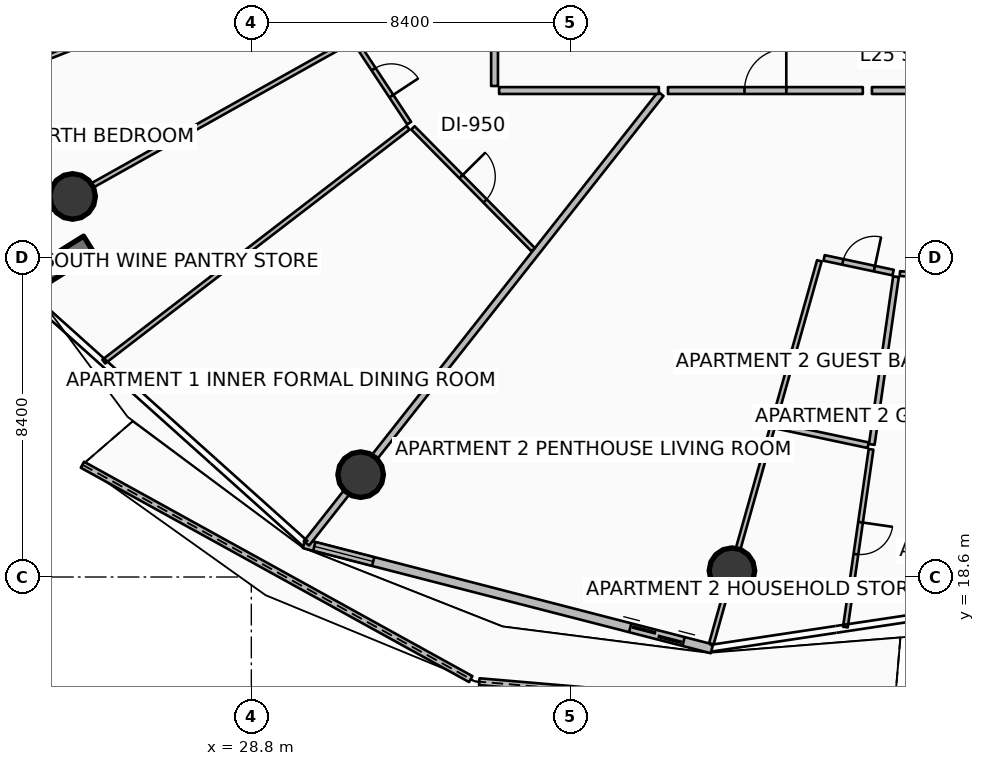
"""IFC4 building model, lengths in metres.
Left out: names, types, materials, properties, quantities, classifications, styles, units other than length and angle.
Written with IfcOpenShell. Run it as: python <this file> out.ifc"""

import sys

from ifc_helpers import new_model, si_unit, direction, frame, frame_2d, origin, origin_2d, place, context, subcontext, project, spatial, polyline, rectangle, circle, outline, extrude, element, fill, save


model = new_model("IFC4")
c1 = context("Model", 3, precision=1e-05, world=origin(), true_north=direction((0.0, 1.0)))
c2 = subcontext(c1, "Body", "Model", "MODEL_VIEW")
j1 = project(units=[si_unit("LENGTHUNIT", "METRE"), si_unit("PLANEANGLEUNIT", "RADIAN")], contexts=[c1])
p1 = place(None, origin())
s1 = spatial("IfcSite", under=j1, at=p1, CompositionType="ELEMENT")
p2 = place(p1, origin())
s2 = spatial("IfcBuilding", under=s1, at=p2, CompositionType="ELEMENT")
p3 = place(p2, frame((0.0, 0.0, 101.4)))
s3 = spatial("IfcBuildingStorey", under=s2, at=p3, CompositionType="ELEMENT", Elevation=101.4)
p4 = place(p3, frame((24.531, 27.335, 0.0), z_axis=(0.0, 0.0, 1.0), x_axis=(-0.848053161125, -0.529911158502, 0.0)))
e1 = element("IfcWall", 1, at=p4, inside=s3, PredefinedType="SOLIDWALL", context=c2, shape_type="SweptSolid", body=[
    extrude(rectangle(XDim=3.5, YDim=0.55, at=frame_2d((1.75, 0.0))), origin(), (0.0, 0.0, 1.0), 3.75),
])
for number, where, z_axis, x_axis in (
    (2, (24.097, 28.614, 0.0), (0.0, 0.0, 1.0), (1.0, 0.0, 0.0)),
    (3, (31.677, 21.294, 0.0), (0.0, 0.0, 1.0), (1.0, 0.0, 0.0)),
    (4, (41.447, 18.766, 0.0), (0.0, 0.0, 1.0), (1.0, 0.0, 0.0)),
):
    element("IfcColumn", number, at=place(p3, frame(where, z_axis=z_axis, x_axis=x_axis)), inside=s3, PredefinedType="COLUMN", context=c2, shape_type="SweptSolid", body=[
        extrude(circle(Radius=0.6, at=origin_2d()), origin(), (0.0, 0.0, 1.0), 3.5),
    ])
p5 = place(p3, frame((24.356, 21.555, 0.0), z_axis=(0.0, 0.0, 1.0), x_axis=(0.875456537623, -0.483296855704, 0.0)))
e5 = element("IfcWall", 5, at=p5, inside=s3, PredefinedType="PARAPET", context=c2, shape_type="SweptSolid", body=[
    extrude(outline(polyline([(0.0, 0.0), (11.672, 0.0), (11.672, 1.148), (5.836, 1.127), (0.0, 1.224), (0.0, 0.0)])), frame((0.0, 0.09, 0.0), z_axis=(0.0, -1.0, 0.0), x_axis=(1.0, 0.0, 0.0)), (0.0, 0.0, 1.0), 0.18),
])
p6 = place(p3, frame((34.799, 15.846, 0.0), z_axis=(0.0, 0.0, 1.0), x_axis=(0.996375069037, -0.08506892383, 0.0)))
e6 = element("IfcWall", 6, at=p6, inside=s3, PredefinedType="PARAPET", context=c2, shape_type="SweptSolid", body=[
    extrude(outline(polyline([(0.0, 0.0), (10.943, 0.0), (10.943, 1.483), (5.471, 1.284), (0.0, 1.148), (0.0, 0.0)])), frame((0.0, 0.09, 0.0), z_axis=(0.0, -1.0, 0.0), x_axis=(1.0, 0.0, 0.0)), (0.0, 0.0, 1.0), 0.18),
])
p7 = place(p3, frame((30.186, 19.477, 0.0), z_axis=(0.0, 0.0, 1.0), x_axis=(0.968356180858, -0.249572248045, 0.0)))
e7 = element("IfcWall", 7, at=p7, inside=s3, PredefinedType="SOLIDWALL", context=c2, shape_type="SweptSolid", body=[
    extrude(rectangle(XDim=11.084, YDim=0.24, at=frame_2d((5.542, 0.0))), origin(), (0.0, 0.0, 1.0), 2.45),
])
p8 = place(p7, frame((8.865, 0.0, 0.0)))
e8 = element("IfcOpeningElement", 8, at=p8, cuts=e7, PredefinedType="OPENING", context=c2, shape_type="SweptSolid", body=[
    extrude(rectangle(XDim=1.45, YDim=2.15, at=frame_2d((0.725, 1.075))), frame((0.0, 0.13, 0.0), z_axis=(0.0, -1.0, 0.0), x_axis=(1.0, 0.0, 0.0)), (0.0, 0.0, 1.0), 0.26),
])
p9 = place(p7, frame((0.28, 0.0, 0.65)))
e9 = element("IfcOpeningElement", 9, at=p9, cuts=e7, PredefinedType="OPENING", context=c2, shape_type="SweptSolid", body=[
    extrude(rectangle(XDim=1.6, YDim=1.5, at=frame_2d((0.8, 0.75))), frame((0.0, 0.13, 0.0), z_axis=(0.0, -1.0, 0.0), x_axis=(1.0, 0.0, 0.0)), (0.0, 0.0, 1.0), 0.26),
])
p10 = place(p3, frame((39.575, 31.314, 0.0), z_axis=(0.0, 0.0, 1.0), x_axis=(-0.619083417853, -0.785325233098, 0.0)))
e10 = element("IfcWall", 10, at=p10, inside=s3, PredefinedType="PARTITIONING", context=c2, shape_type="SweptSolid", body=[
    extrude(rectangle(XDim=15.063, YDim=0.18, at=frame_2d((7.532, 0.0))), origin(), (0.0, 0.0, 1.0), 2.94),
])
p11 = place(p3, frame((30.326, 35.002, 0.0), z_axis=(0.0, 0.0, 1.0), x_axis=(-0.929777602375, -0.368121732748, 0.0)))
e11 = element("IfcWall", 11, at=p11, inside=s3, PredefinedType="PARTITIONING", context=c2, shape_type="SweptSolid", body=[
    extrude(rectangle(XDim=9.961, YDim=0.125, at=frame_2d((4.98, 0.0))), origin(), (0.0, 0.0, 1.0), 2.94),
])
p12 = place(p3, frame((35.2, 34.712, 0.0), z_axis=(0.0, 0.0, 1.0), x_axis=(0.0, -1.0, 0.0)))
e12 = element("IfcWall", 12, at=p12, inside=s3, PredefinedType="PARTITIONING", context=c2, shape_type="SweptSolid", body=[
    extrude(rectangle(XDim=3.192, YDim=0.18, at=frame_2d((1.596, 0.0))), origin(), (0.0, 0.0, 1.0), 2.94),
])
p13 = place(p3, frame((35.32, 31.4, 0.0), z_axis=(0.0, 0.0, 1.0), x_axis=(1.0, 0.0, 0.0)))
e13 = element("IfcWall", 13, at=p13, inside=s3, PredefinedType="PARTITIONING", context=c2, shape_type="SweptSolid", body=[
    extrude(rectangle(XDim=4.204, YDim=0.18, at=frame_2d((2.102, 0.0))), origin(), (0.0, 0.0, 1.0), 2.94),
])
p14 = place(p3, frame((31.406, 32.707, 0.0), z_axis=(0.0, 0.0, 1.0), x_axis=(-0.872500841978, -0.488612608052, 0.0)))
e14 = element("IfcWall", 14, at=p14, inside=s3, PredefinedType="PARTITIONING", context=c2, shape_type="SweptSolid", body=[
    extrude(rectangle(XDim=10.46, YDim=0.125, at=frame_2d((5.23, 0.0))), origin(), (0.0, 0.0, 1.0), 2.94),
])
p15 = place(p3, frame((32.925, 30.42, 0.0), z_axis=(0.0, 0.0, 1.0), x_axis=(-0.793033627653, -0.609177860244, 0.0)))
e15 = element("IfcWall", 15, at=p15, inside=s3, PredefinedType="PARTITIONING", context=c2, shape_type="SweptSolid", body=[
    extrude(rectangle(XDim=10.099, YDim=0.125, at=frame_2d((5.049, 0.0))), origin(), (0.0, 0.0, 1.0), 2.94),
])
p16 = place(p3, frame((31.548, 32.672, 0.0), z_axis=(0.0, 0.0, 1.0), x_axis=(0.550387635728, -0.834909246827, 0.0)))
e16 = element("IfcWall", 16, at=p16, inside=s3, PredefinedType="PARTITIONING", context=c2, shape_type="SweptSolid", body=[
    extrude(rectangle(XDim=2.552, YDim=0.125, at=frame_2d((1.276, 0.0))), origin(), (0.0, 0.0, 1.0), 2.94),
])
p17 = place(p16, frame((0.851, 0.0, 0.0)))
e17 = element("IfcOpeningElement", 17, at=p17, cuts=e16, PredefinedType="OPENING", context=c2, shape_type="SweptSolid", body=[
    extrude(rectangle(XDim=0.85, YDim=2.06, at=frame_2d((0.425, 1.03))), frame((0.0, 0.073, 0.0), z_axis=(0.0, -1.0, 0.0), x_axis=(1.0, 0.0, 0.0)), (0.0, 0.0, 1.0), 0.145),
])
p18 = place(p3, frame((33.053, 30.418, 0.0), z_axis=(0.0, 0.0, 1.0), x_axis=(0.702647387595, -0.711538227157, 0.0)))
e18 = element("IfcWall", 18, at=p18, inside=s3, PredefinedType="PARTITIONING", context=c2, shape_type="SweptSolid", body=[
    extrude(rectangle(XDim=4.503, YDim=0.125, at=frame_2d((2.252, 0.0))), origin(), (0.0, 0.0, 1.0), 2.94),
])
p19 = place(p18, frame((1.802, 0.0, 0.0)))
e19 = element("IfcOpeningElement", 19, at=p19, cuts=e18, PredefinedType="OPENING", context=c2, shape_type="SweptSolid", body=[
    extrude(rectangle(XDim=0.9, YDim=2.08, at=frame_2d((0.45, 1.04))), frame((0.0, 0.073, 0.0), z_axis=(0.0, -1.0, 0.0), x_axis=(1.0, 0.0, 0.0)), (0.0, 0.0, 1.0), 0.145),
])
p20 = place(p3, frame((39.764, 31.4, 0.0), z_axis=(0.0, 0.0, 1.0), x_axis=(1.0, 0.0, 0.0)))
e20 = element("IfcWall", 20, at=p20, inside=s3, PredefinedType="PARTITIONING", context=c2, shape_type="SweptSolid", body=[
    extrude(rectangle(XDim=5.127, YDim=0.18, at=frame_2d((2.563, 0.0))), origin(), (0.0, 0.0, 1.0), 2.94),
])
p21 = place(p20, frame((2.013, 0.0, 0.0)))
e21 = element("IfcOpeningElement", 21, at=p21, cuts=e20, PredefinedType="OPENING", context=c2, shape_type="SweptSolid", body=[
    extrude(rectangle(XDim=1.1, YDim=2.1, at=frame_2d((0.55, 1.05))), frame((0.0, 0.1, 0.0), z_axis=(0.0, -1.0, 0.0), x_axis=(1.0, 0.0, 0.0)), (0.0, 0.0, 1.0), 0.2),
])
p22 = place(p3, frame((45.131, 31.4, 0.0), z_axis=(0.0, 0.0, 1.0), x_axis=(1.0, 0.0, 0.0)))
e22 = element("IfcWall", 22, at=p22, inside=s3, PredefinedType="PARTITIONING", context=c2, shape_type="SweptSolid", body=[
    extrude(rectangle(XDim=4.004, YDim=0.18, at=frame_2d((2.002, 0.0))), origin(), (0.0, 0.0, 1.0), 2.94),
])
p23 = place(p3, frame((43.747, 26.92, 0.0), z_axis=(0.0, 0.0, 1.0), x_axis=(-0.271445765154, -0.962453737371, 0.0)))
e23 = element("IfcWall", 23, at=p23, inside=s3, PredefinedType="PARTITIONING", context=c2, shape_type="SweptSolid", body=[
    extrude(rectangle(XDim=10.47, YDim=0.125, at=frame_2d((5.235, 0.0))), origin(), (0.0, 0.0, 1.0), 2.94),
])
p24 = place(p3, frame((43.872, 26.996, 0.0), z_axis=(0.0, 0.0, 1.0), x_axis=(0.978233316216, -0.207508021641, 0.0)))
e24 = element("IfcWall", 24, at=p24, inside=s3, PredefinedType="PARTITIONING", context=c2, shape_type="SweptSolid", body=[
    extrude(rectangle(XDim=1.857, YDim=0.15, at=frame_2d((0.928, 0.0))), origin(), (0.0, 0.0, 1.0), 2.94),
])
p25 = place(p24, frame((0.503, 0.0, 0.0)))
e25 = element("IfcOpeningElement", 25, at=p25, cuts=e24, PredefinedType="OPENING", context=c2, shape_type="SweptSolid", body=[
    extrude(rectangle(XDim=0.85, YDim=2.06, at=frame_2d((0.425, 1.03))), frame((0.0, 0.085, 0.0), z_axis=(0.0, -1.0, 0.0), x_axis=(1.0, 0.0, 0.0)), (0.0, 0.0, 1.0), 0.17),
])
p26 = place(p3, frame((42.626, 22.578, 0.0), z_axis=(0.0, 0.0, 1.0), x_axis=(0.978227408947, -0.207535867706, 0.0)))
e26 = element("IfcWall", 26, at=p26, inside=s3, PredefinedType="PARTITIONING", context=c2, shape_type="SweptSolid", body=[
    extrude(rectangle(XDim=2.46, YDim=0.15, at=frame_2d((1.23, 0.0))), origin(), (0.0, 0.0, 1.0), 2.94),
])
p27 = place(p3, frame((45.763, 26.502, 0.0), z_axis=(0.0, 0.0, 1.0), x_axis=(-0.142823722461, -0.989748141853, 0.0)))
e27 = element("IfcWall", 27, at=p27, inside=s3, PredefinedType="PARTITIONING", context=c2, shape_type="SweptSolid", body=[
    extrude(rectangle(XDim=4.46, YDim=0.15, at=frame_2d((2.23, 0.0))), origin(), (0.0, 0.0, 1.0), 2.94),
])
p28 = place(p3, frame((45.108, 21.96, 0.0), z_axis=(0.0, 0.0, 1.0), x_axis=(-0.142860663544, -0.989742810437, 0.0)))
e28 = element("IfcWall", 28, at=p28, inside=s3, PredefinedType="PARTITIONING", context=c2, shape_type="SweptSolid", body=[
    extrude(rectangle(XDim=4.725, YDim=0.125, at=frame_2d((2.363, 0.0))), origin(), (0.0, 0.0, 1.0), 2.94),
])
p29 = place(p28, frame((1.938, 0.0, 0.0)))
e29 = element("IfcOpeningElement", 29, at=p29, cuts=e28, PredefinedType="OPENING", context=c2, shape_type="SweptSolid", body=[
    extrude(rectangle(XDim=0.85, YDim=2.06, at=frame_2d((0.425, 1.03))), frame((0.0, 0.073, 0.0), z_axis=(0.0, -1.0, 0.0), x_axis=(1.0, 0.0, 0.0)), (0.0, 0.0, 1.0), 0.145),
])
p30 = place(p3, frame((45.866, 26.585, 0.0), z_axis=(0.0, 0.0, 1.0), x_axis=(0.996949395434, -0.078050643458, 0.0)))
e30 = element("IfcWall", 30, at=p30, inside=s3, PredefinedType="PARTITIONING", context=c2, shape_type="SweptSolid", body=[
    extrude(rectangle(XDim=1.861, YDim=0.125, at=frame_2d((0.931, 0.0))), origin(), (0.0, 0.0, 1.0), 2.94),
])
p31 = place(p30, frame((0.506, 0.0, 0.0)))
e31 = element("IfcOpeningElement", 31, at=p31, cuts=e30, PredefinedType="OPENING", context=c2, shape_type="SweptSolid", body=[
    extrude(rectangle(XDim=0.85, YDim=2.06, at=frame_2d((0.425, 1.03))), frame((0.0, 0.073, 0.0), z_axis=(0.0, -1.0, 0.0), x_axis=(1.0, 0.0, 0.0)), (0.0, 0.0, 1.0), 0.145),
])
p32 = place(p8, origin())
e32 = element("IfcDoor", 32, at=p32, inside=s3, OperationType="DOUBLE_DOOR_SLIDING", PredefinedType="DOOR", context=c2, shape_type="SweptSolid", body=[
    extrude(rectangle(XDim=1.45, YDim=2.15, at=frame_2d((0.725, 1.075))), frame((0.0, 0.025, 0.0), z_axis=(0.0, -1.0, 0.0), x_axis=(1.0, 0.0, 0.0)), (0.0, 0.0, 1.0), 0.05),
])
fill(e8, e32)
p33 = place(p9, origin())
e33 = element("IfcWindow", 33, at=p33, inside=s3, PartitioningType="SINGLE_PANEL", PredefinedType="WINDOW", context=c2, shape_type="SweptSolid", body=[
    extrude(rectangle(XDim=1.6, YDim=1.5, at=frame_2d((0.8, 0.75))), frame((0.0, 0.03, 0.0), z_axis=(0.0, -1.0, 0.0), x_axis=(1.0, 0.0, 0.0)), (0.0, 0.0, 1.0), 0.06),
])
fill(e9, e33)
p34 = place(p17, origin())
e34 = element("IfcDoor", 34, at=p34, inside=s3, OperationType="SINGLE_SWING_RIGHT", PredefinedType="DOOR", context=c2, shape_type="SweptSolid", body=[
    extrude(rectangle(XDim=0.85, YDim=2.06, at=frame_2d((0.425, 1.03))), frame((0.0, 0.025, 0.0), z_axis=(0.0, -1.0, 0.0), x_axis=(1.0, 0.0, 0.0)), (0.0, 0.0, 1.0), 0.05),
])
fill(e17, e34)
p35 = place(p19, origin())
e35 = element("IfcDoor", 35, at=p35, inside=s3, OperationType="SINGLE_SWING_LEFT", PredefinedType="DOOR", context=c2, shape_type="SweptSolid", body=[
    extrude(rectangle(XDim=0.9, YDim=2.08, at=frame_2d((0.45, 1.04))), frame((0.0, 0.025, 0.0), z_axis=(0.0, -1.0, 0.0), x_axis=(1.0, 0.0, 0.0)), (0.0, 0.0, 1.0), 0.05),
])
fill(e19, e35)
p36 = place(p21, origin())
e36 = element("IfcDoor", 36, at=p36, inside=s3, OperationType="SINGLE_SWING_RIGHT", PredefinedType="DOOR", context=c2, shape_type="SweptSolid", body=[
    extrude(rectangle(XDim=1.1, YDim=2.1, at=frame_2d((0.55, 1.05))), frame((0.0, 0.025, 0.0), z_axis=(0.0, -1.0, 0.0), x_axis=(1.0, 0.0, 0.0)), (0.0, 0.0, 1.0), 0.05),
])
fill(e21, e36)
p37 = place(p25, origin())
e37 = element("IfcDoor", 37, at=p37, inside=s3, OperationType="SINGLE_SWING_RIGHT", PredefinedType="DOOR", context=c2, shape_type="SweptSolid", body=[
    extrude(rectangle(XDim=0.85, YDim=2.06, at=frame_2d((0.425, 1.03))), frame((0.0, 0.025, 0.0), z_axis=(0.0, -1.0, 0.0), x_axis=(1.0, 0.0, 0.0)), (0.0, 0.0, 1.0), 0.05),
])
fill(e25, e37)
p38 = place(p29, origin())
e38 = element("IfcDoor", 38, at=p38, inside=s3, OperationType="SINGLE_SWING_LEFT", PredefinedType="DOOR", context=c2, shape_type="SweptSolid", body=[
    extrude(rectangle(XDim=0.85, YDim=2.06, at=frame_2d((0.425, 1.03))), frame((0.0, 0.025, 0.0), z_axis=(0.0, -1.0, 0.0), x_axis=(1.0, 0.0, 0.0)), (0.0, 0.0, 1.0), 0.05),
])
fill(e29, e38)
save(model, sys.argv[1])
